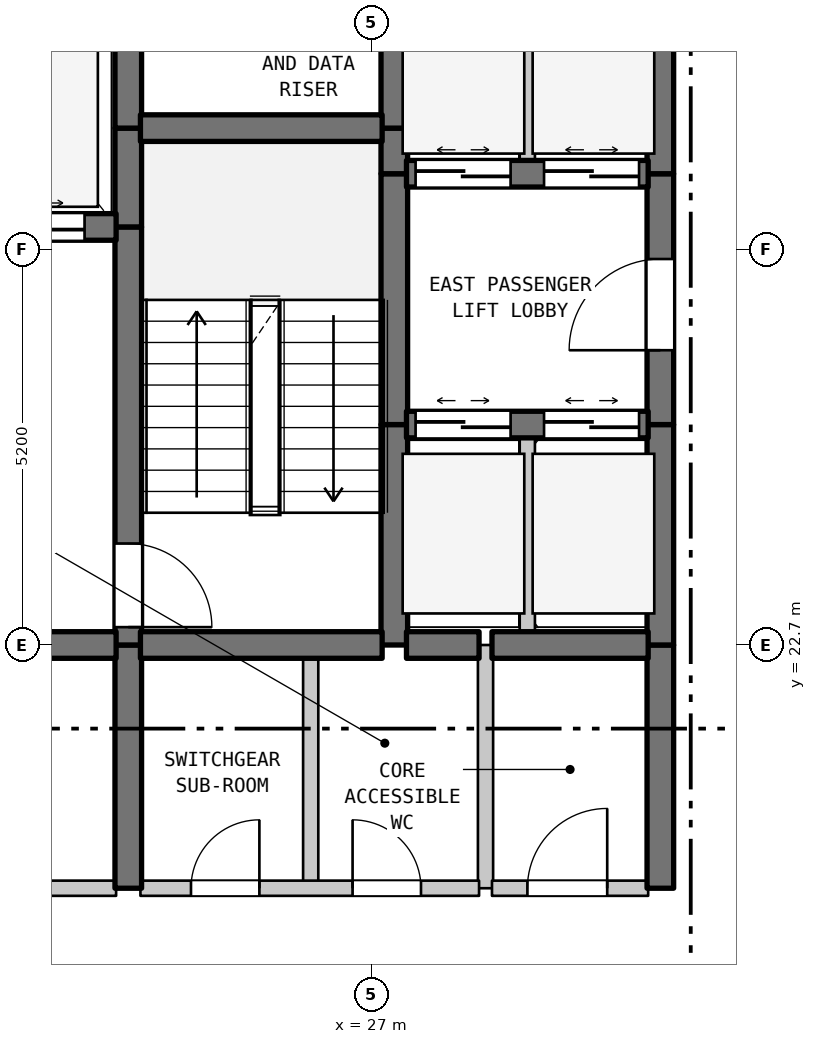
"""IFC4 building model, lengths in metres.
Left out: names, types, materials, properties, quantities, classifications, styles, units other than length and angle.
Written with IfcOpenShell. Run it as: python <this file> out.ifc"""

import sys

from ifc_helpers import new_model, si_unit, direction, frame, frame_2d, origin, place, context, subcontext, project, spatial, rectangle, extrude, element, fill, save


model = new_model("IFC4")
c1 = context("Model", 3, precision=1e-05, world=origin(), true_north=direction((0.0, 1.0)))
c2 = subcontext(c1, "Body", "Model", "MODEL_VIEW")
j1 = project(units=[si_unit("LENGTHUNIT", "METRE"), si_unit("PLANEANGLEUNIT", "RADIAN")], contexts=[c1])
p1 = place(None, origin())
s1 = spatial("IfcSite", under=j1, at=p1, CompositionType="ELEMENT")
p2 = place(p1, origin())
s2 = spatial("IfcBuilding", under=s1, at=p2, CompositionType="ELEMENT")
p3 = place(p2, frame((0.0, 0.0, 214.3)))
s3 = spatial("IfcBuildingStorey", under=s2, at=p3, CompositionType="ELEMENT", Elevation=214.3)
p4 = place(p3, frame((23.8, 19.5, 0.0), z_axis=(0.0, 0.0, 1.0), x_axis=(0.0, 1.0, 0.0)))
e1 = element("IfcWall", 1, at=p4, inside=s3, PredefinedType="SHEAR", context=c2, shape_type="SweptSolid", body=[
    extrude(rectangle(XDim=3.2, YDim=0.35, at=frame_2d((1.6, 0.0))), origin(), (0.0, 0.0, 1.0), 3.38),
])
p5 = place(p3, frame((23.8, 22.7, 0.0), z_axis=(0.0, 0.0, 1.0), x_axis=(0.0, 1.0, 0.0)))
e2 = element("IfcWall", 2, at=p5, inside=s3, PredefinedType="SHEAR", context=c2, shape_type="SweptSolid", body=[
    extrude(rectangle(XDim=5.5, YDim=0.35, at=frame_2d((2.75, 0.0))), origin(), (0.0, 0.0, 1.0), 3.38),
])
p6 = place(p5, frame((0.235, 0.0, 0.0)))
e3 = element("IfcOpeningElement", 3, at=p6, cuts=e2, PredefinedType="OPENING", context=c2, shape_type="SweptSolid", body=[
    extrude(rectangle(XDim=1.1, YDim=2.15, at=frame_2d((0.55, 1.075))), frame((0.0, 0.185, 0.0), z_axis=(0.0, -1.0, 0.0), x_axis=(1.0, 0.0, 0.0)), (0.0, 0.0, 1.0), 0.37),
])
for number, where, z_axis, x_axis in (
    (4, (23.8, 28.2, 0.0), (0.0, 0.0, 1.0), (0.0, 1.0, 0.0)),
    (5, (23.8, 29.5, 0.0), (0.0, 0.0, 1.0), (0.0, 1.0, 0.0)),
):
    element("IfcWall", number, at=place(p3, frame(where, z_axis=z_axis, x_axis=x_axis)), inside=s3, PredefinedType="SHEAR", context=c2, shape_type="SweptSolid", body=[
        extrude(rectangle(XDim=1.3, YDim=0.35, at=frame_2d((0.65, 0.0))), origin(), (0.0, 0.0, 1.0), 3.38),
    ])
p7 = place(p3, frame((26.2, 19.5, 0.0), z_axis=(0.0, 0.0, 1.0), x_axis=(0.0, 1.0, 0.0)))
e6 = element("IfcWall", 6, at=p7, inside=s3, PredefinedType="STANDARD", context=c2, shape_type="SweptSolid", body=[
    extrude(rectangle(XDim=3.2, YDim=0.2, at=frame_2d((1.6, 0.0))), origin(), (0.0, 0.0, 1.0), 3.38),
])
p8 = place(p3, frame((27.3, 22.7, 0.0), z_axis=(0.0, 0.0, 1.0), x_axis=(0.0, 1.0, 0.0)))
e7 = element("IfcWall", 7, at=p8, inside=s3, PredefinedType="SHEAR", context=c2, shape_type="SweptSolid", body=[
    extrude(rectangle(XDim=2.9, YDim=0.35, at=frame_2d((1.45, 0.0))), origin(), (0.0, 0.0, 1.0), 3.38),
])
p9 = place(p3, frame((27.3, 25.6, 0.0), z_axis=(0.0, 0.0, 1.0), x_axis=(0.0, 1.0, 0.0)))
e8 = element("IfcWall", 8, at=p9, inside=s3, PredefinedType="SHEAR", context=c2, shape_type="SweptSolid", body=[
    extrude(rectangle(XDim=3.3, YDim=0.35, at=frame_2d((1.65, 0.0))), origin(), (0.0, 0.0, 1.0), 3.38),
])
p10 = place(p3, frame((27.3, 28.9, 0.0), z_axis=(0.0, 0.0, 1.0), x_axis=(0.0, 1.0, 0.0)))
e9 = element("IfcWall", 9, at=p10, inside=s3, PredefinedType="SHEAR", context=c2, shape_type="SweptSolid", body=[
    extrude(rectangle(XDim=0.6, YDim=0.35, at=frame_2d((0.3, 0.0))), origin(), (0.0, 0.0, 1.0), 3.38),
])
p11 = place(p3, frame((27.3, 29.5, 0.0), z_axis=(0.0, 0.0, 1.0), x_axis=(0.0, 1.0, 0.0)))
e10 = element("IfcWall", 10, at=p11, inside=s3, PredefinedType="SHEAR", context=c2, shape_type="SweptSolid", body=[
    extrude(rectangle(XDim=2.0, YDim=0.35, at=frame_2d((1.0, 0.0))), origin(), (0.0, 0.0, 1.0), 3.38),
])
p12 = place(p3, frame((28.5, 19.5, 0.0), z_axis=(0.0, 0.0, 1.0), x_axis=(0.0, 1.0, 0.0)))
e11 = element("IfcWall", 11, at=p12, inside=s3, PredefinedType="STANDARD", context=c2, shape_type="SweptSolid", body=[
    extrude(rectangle(XDim=3.2, YDim=0.2, at=frame_2d((1.6, 0.0))), origin(), (0.0, 0.0, 1.0), 3.38),
])
p13 = place(p3, frame((29.05, 22.7, 0.0), z_axis=(0.0, 0.0, 1.0), x_axis=(0.0, 1.0, 0.0)))
e12 = element("IfcWall", 12, at=p13, inside=s3, PredefinedType="STANDARD", context=c2, shape_type="SweptSolid", body=[
    extrude(rectangle(XDim=2.9, YDim=0.2, at=frame_2d((1.45, 0.0))), origin(), (0.0, 0.0, 1.0), 3.38),
])
p14 = place(p3, frame((29.05, 28.9, 0.0), z_axis=(0.0, 0.0, 1.0), x_axis=(0.0, 1.0, 0.0)))
e13 = element("IfcWall", 13, at=p14, inside=s3, PredefinedType="STANDARD", context=c2, shape_type="SweptSolid", body=[
    extrude(rectangle(XDim=2.6, YDim=0.2, at=frame_2d((1.3, 0.0))), origin(), (0.0, 0.0, 1.0), 3.38),
])
p15 = place(p3, frame((30.8, 19.5, 0.0), z_axis=(0.0, 0.0, 1.0), x_axis=(0.0, 1.0, 0.0)))
e14 = element("IfcWall", 14, at=p15, inside=s3, PredefinedType="SHEAR", context=c2, shape_type="SweptSolid", body=[
    extrude(rectangle(XDim=3.2, YDim=0.35, at=frame_2d((1.6, 0.0))), origin(), (0.0, 0.0, 1.0), 3.38),
])
p16 = place(p3, frame((30.8, 22.7, 0.0), z_axis=(0.0, 0.0, 1.0), x_axis=(0.0, 1.0, 0.0)))
e15 = element("IfcWall", 15, at=p16, inside=s3, PredefinedType="SHEAR", context=c2, shape_type="SweptSolid", body=[
    extrude(rectangle(XDim=2.9, YDim=0.35, at=frame_2d((1.45, 0.0))), origin(), (0.0, 0.0, 1.0), 3.38),
])
p17 = place(p3, frame((30.8, 25.6, 0.0), z_axis=(0.0, 0.0, 1.0), x_axis=(0.0, 1.0, 0.0)))
e16 = element("IfcWall", 16, at=p17, inside=s3, PredefinedType="SHEAR", context=c2, shape_type="SweptSolid", body=[
    extrude(rectangle(XDim=3.3, YDim=0.35, at=frame_2d((1.65, 0.0))), origin(), (0.0, 0.0, 1.0), 3.38),
])
p18 = place(p17, frame((0.978, 0.0, 0.0)))
e17 = element("IfcOpeningElement", 17, at=p18, cuts=e16, PredefinedType="OPENING", context=c2, shape_type="SweptSolid", body=[
    extrude(rectangle(XDim=1.2, YDim=2.2, at=frame_2d((0.6, 1.1))), frame((0.0, 0.185, 0.0), z_axis=(0.0, -1.0, 0.0), x_axis=(1.0, 0.0, 0.0)), (0.0, 0.0, 1.0), 0.37),
])
p19 = place(p3, frame((30.8, 28.9, 0.0), z_axis=(0.0, 0.0, 1.0), x_axis=(0.0, 1.0, 0.0)))
e18 = element("IfcWall", 18, at=p19, inside=s3, PredefinedType="SHEAR", context=c2, shape_type="SweptSolid", body=[
    extrude(rectangle(XDim=2.6, YDim=0.35, at=frame_2d((1.3, 0.0))), origin(), (0.0, 0.0, 1.0), 3.38),
])
p20 = place(p3, frame((19.16, 19.5, 0.0), z_axis=(0.0, 0.0, 1.0), x_axis=(1.0, 0.0, 0.0)))
e19 = element("IfcWall", 19, at=p20, inside=s3, PredefinedType="STANDARD", context=c2, shape_type="SweptSolid", body=[
    extrude(rectangle(XDim=4.48, YDim=0.2, at=frame_2d((2.24, 0.0))), origin(), (0.0, 0.0, 1.0), 3.38),
])
p21 = place(p20, frame((1.64, 0.0, 0.0)))
e20 = element("IfcOpeningElement", 20, at=p21, cuts=e19, PredefinedType="OPENING", context=c2, shape_type="SweptSolid", body=[
    extrude(rectangle(XDim=1.2, YDim=2.2, at=frame_2d((0.6, 1.1))), frame((0.0, 0.11, 0.0), z_axis=(0.0, -1.0, 0.0), x_axis=(1.0, 0.0, 0.0)), (0.0, 0.0, 1.0), 0.22),
])
p22 = place(p3, frame((23.96, 19.5, 0.0), z_axis=(0.0, 0.0, 1.0), x_axis=(1.0, 0.0, 0.0)))
e21 = element("IfcWall", 21, at=p22, inside=s3, PredefinedType="STANDARD", context=c2, shape_type="SweptSolid", body=[
    extrude(rectangle(XDim=4.455, YDim=0.2, at=frame_2d((2.228, 0.0))), origin(), (0.0, 0.0, 1.0), 3.38),
])
p23 = place(p22, frame((0.665, 0.0, 0.0)))
e22 = element("IfcOpeningElement", 22, at=p23, cuts=e21, PredefinedType="OPENING", context=c2, shape_type="SweptSolid", body=[
    extrude(rectangle(XDim=0.9, YDim=2.15, at=frame_2d((0.45, 1.075))), frame((0.0, 0.11, 0.0), z_axis=(0.0, -1.0, 0.0), x_axis=(1.0, 0.0, 0.0)), (0.0, 0.0, 1.0), 0.22),
])
p24 = place(p22, frame((2.791, 0.0, 0.0)))
e23 = element("IfcOpeningElement", 23, at=p24, cuts=e21, PredefinedType="OPENING", context=c2, shape_type="SweptSolid", body=[
    extrude(rectangle(XDim=0.9, YDim=2.15, at=frame_2d((0.45, 1.075))), frame((0.0, 0.11, 0.0), z_axis=(0.0, -1.0, 0.0), x_axis=(1.0, 0.0, 0.0)), (0.0, 0.0, 1.0), 0.22),
])
p25 = place(p3, frame((28.585, 19.5, 0.0), z_axis=(0.0, 0.0, 1.0), x_axis=(1.0, 0.0, 0.0)))
e24 = element("IfcWall", 24, at=p25, inside=s3, PredefinedType="STANDARD", context=c2, shape_type="SweptSolid", body=[
    extrude(rectangle(XDim=2.055, YDim=0.2, at=frame_2d((1.027, 0.0))), origin(), (0.0, 0.0, 1.0), 3.38),
])
p26 = place(p25, frame((0.466, 0.0, 0.0)))
e25 = element("IfcOpeningElement", 25, at=p26, cuts=e24, PredefinedType="OPENING", context=c2, shape_type="SweptSolid", body=[
    extrude(rectangle(XDim=1.05, YDim=2.15, at=frame_2d((0.525, 1.075))), frame((0.0, 0.11, 0.0), z_axis=(0.0, -1.0, 0.0), x_axis=(1.0, 0.0, 0.0)), (0.0, 0.0, 1.0), 0.22),
])
p27 = place(p3, frame((19.16, 22.7, 0.0), z_axis=(0.0, 0.0, 1.0), x_axis=(1.0, 0.0, 0.0)))
e26 = element("IfcWall", 26, at=p27, inside=s3, PredefinedType="SHEAR", context=c2, shape_type="SweptSolid", body=[
    extrude(rectangle(XDim=4.48, YDim=0.35, at=frame_2d((2.24, 0.0))), origin(), (0.0, 0.0, 1.0), 3.38),
])
p28 = place(p27, frame((1.64, 0.0, 0.0)))
e27 = element("IfcOpeningElement", 27, at=p28, cuts=e26, PredefinedType="OPENING", context=c2, shape_type="SweptSolid", body=[
    extrude(rectangle(XDim=1.2, YDim=2.2, at=frame_2d((0.6, 1.1))), frame((0.0, 0.185, 0.0), z_axis=(0.0, -1.0, 0.0), x_axis=(1.0, 0.0, 0.0)), (0.0, 0.0, 1.0), 0.37),
])
p29 = place(p3, frame((23.96, 22.7, 0.0), z_axis=(0.0, 0.0, 1.0), x_axis=(1.0, 0.0, 0.0)))
e28 = element("IfcWall", 28, at=p29, inside=s3, PredefinedType="SHEAR", context=c2, shape_type="SweptSolid", body=[
    extrude(rectangle(XDim=3.18, YDim=0.35, at=frame_2d((1.59, 0.0))), origin(), (0.0, 0.0, 1.0), 3.38),
])
p30 = place(p3, frame((27.46, 22.7, 0.0), z_axis=(0.0, 0.0, 1.0), x_axis=(1.0, 0.0, 0.0)))
e29 = element("IfcWall", 29, at=p30, inside=s3, PredefinedType="SHEAR", context=c2, shape_type="SweptSolid", body=[
    extrude(rectangle(XDim=0.955, YDim=0.35, at=frame_2d((0.478, 0.0))), origin(), (0.0, 0.0, 1.0), 3.38),
])
p31 = place(p3, frame((28.585, 22.7, 0.0), z_axis=(0.0, 0.0, 1.0), x_axis=(1.0, 0.0, 0.0)))
e30 = element("IfcWall", 30, at=p31, inside=s3, PredefinedType="SHEAR", context=c2, shape_type="SweptSolid", body=[
    extrude(rectangle(XDim=2.055, YDim=0.35, at=frame_2d((1.027, 0.0))), origin(), (0.0, 0.0, 1.0), 3.38),
])
p32 = place(p3, frame((27.46, 25.6, 0.0), z_axis=(0.0, 0.0, 1.0), x_axis=(1.0, 0.0, 0.0)))
e31 = element("IfcWall", 31, at=p32, inside=s3, PredefinedType="SHEAR", context=c2, shape_type="SweptSolid", body=[
    extrude(rectangle(XDim=3.18, YDim=0.35, at=frame_2d((1.59, 0.0))), origin(), (0.0, 0.0, 1.0), 3.38),
])
p33 = place(p32, frame((0.12, 0.0, 0.0)))
e32 = element("IfcOpeningElement", 32, at=p33, cuts=e31, PredefinedType="OPENING", context=c2, shape_type="SweptSolid", body=[
    extrude(rectangle(XDim=1.25, YDim=2.2, at=frame_2d((0.625, 1.1))), frame((0.0, 0.185, 0.0), z_axis=(0.0, -1.0, 0.0), x_axis=(1.0, 0.0, 0.0)), (0.0, 0.0, 1.0), 0.37),
])
p34 = place(p32, frame((1.81, 0.0, 0.0)))
e33 = element("IfcOpeningElement", 33, at=p34, cuts=e31, PredefinedType="OPENING", context=c2, shape_type="SweptSolid", body=[
    extrude(rectangle(XDim=1.25, YDim=2.2, at=frame_2d((0.625, 1.1))), frame((0.0, 0.185, 0.0), z_axis=(0.0, -1.0, 0.0), x_axis=(1.0, 0.0, 0.0)), (0.0, 0.0, 1.0), 0.37),
])
p35 = place(p3, frame((19.16, 28.2, 0.0), z_axis=(0.0, 0.0, 1.0), x_axis=(1.0, 0.0, 0.0)))
e34 = element("IfcWall", 34, at=p35, inside=s3, PredefinedType="SHEAR", context=c2, shape_type="SweptSolid", body=[
    extrude(rectangle(XDim=4.48, YDim=0.35, at=frame_2d((2.24, 0.0))), origin(), (0.0, 0.0, 1.0), 3.38),
])
p36 = place(p35, frame((0.415, 0.0, 0.0)))
e35 = element("IfcOpeningElement", 35, at=p36, cuts=e34, PredefinedType="OPENING", context=c2, shape_type="SweptSolid", body=[
    extrude(rectangle(XDim=1.25, YDim=2.2, at=frame_2d((0.625, 1.1))), frame((0.0, 0.185, 0.0), z_axis=(0.0, -1.0, 0.0), x_axis=(1.0, 0.0, 0.0)), (0.0, 0.0, 1.0), 0.37),
])
p37 = place(p35, frame((2.815, 0.0, 0.0)))
e36 = element("IfcOpeningElement", 36, at=p37, cuts=e34, PredefinedType="OPENING", context=c2, shape_type="SweptSolid", body=[
    extrude(rectangle(XDim=1.25, YDim=2.2, at=frame_2d((0.625, 1.1))), frame((0.0, 0.185, 0.0), z_axis=(0.0, -1.0, 0.0), x_axis=(1.0, 0.0, 0.0)), (0.0, 0.0, 1.0), 0.37),
])
p38 = place(p3, frame((27.46, 28.9, 0.0), z_axis=(0.0, 0.0, 1.0), x_axis=(1.0, 0.0, 0.0)))
e37 = element("IfcWall", 37, at=p38, inside=s3, PredefinedType="SHEAR", context=c2, shape_type="SweptSolid", body=[
    extrude(rectangle(XDim=3.18, YDim=0.35, at=frame_2d((1.59, 0.0))), origin(), (0.0, 0.0, 1.0), 3.38),
])
p39 = place(p38, frame((0.12, 0.0, 0.0)))
e38 = element("IfcOpeningElement", 38, at=p39, cuts=e37, PredefinedType="OPENING", context=c2, shape_type="SweptSolid", body=[
    extrude(rectangle(XDim=1.25, YDim=2.2, at=frame_2d((0.625, 1.1))), frame((0.0, 0.185, 0.0), z_axis=(0.0, -1.0, 0.0), x_axis=(1.0, 0.0, 0.0)), (0.0, 0.0, 1.0), 0.37),
])
p40 = place(p38, frame((1.81, 0.0, 0.0)))
e39 = element("IfcOpeningElement", 39, at=p40, cuts=e37, PredefinedType="OPENING", context=c2, shape_type="SweptSolid", body=[
    extrude(rectangle(XDim=1.25, YDim=2.2, at=frame_2d((0.625, 1.1))), frame((0.0, 0.185, 0.0), z_axis=(0.0, -1.0, 0.0), x_axis=(1.0, 0.0, 0.0)), (0.0, 0.0, 1.0), 0.37),
])
p41 = place(p3, frame((23.96, 29.5, 0.0), z_axis=(0.0, 0.0, 1.0), x_axis=(1.0, 0.0, 0.0)))
e40 = element("IfcWall", 40, at=p41, inside=s3, PredefinedType="SHEAR", context=c2, shape_type="SweptSolid", body=[
    extrude(rectangle(XDim=3.18, YDim=0.35, at=frame_2d((1.59, 0.0))), origin(), (0.0, 0.0, 1.0), 3.38),
])
p42 = place(p6, frame((1.1, 0.0, 0.0), z_axis=(0.0, 0.0, 1.0), x_axis=(-1.0, 0.0, 0.0)))
e41 = element("IfcDoor", 41, at=p42, inside=s3, OperationType="SINGLE_SWING_LEFT", PredefinedType="DOOR", context=c2, shape_type="SweptSolid", body=[
    extrude(rectangle(XDim=1.1, YDim=2.15, at=frame_2d((0.55, 1.075))), frame((0.0, 0.025, 0.0), z_axis=(0.0, -1.0, 0.0), x_axis=(1.0, 0.0, 0.0)), (0.0, 0.0, 1.0), 0.05),
])
fill(e3, e41)
p43 = place(p18, origin())
e42 = element("IfcDoor", 42, at=p43, inside=s3, OperationType="SINGLE_SWING_LEFT", PredefinedType="DOOR", context=c2, shape_type="SweptSolid", body=[
    extrude(rectangle(XDim=1.2, YDim=2.2, at=frame_2d((0.6, 1.1))), frame((0.0, 0.025, 0.0), z_axis=(0.0, -1.0, 0.0), x_axis=(1.0, 0.0, 0.0)), (0.0, 0.0, 1.0), 0.05),
])
fill(e17, e42)
p44 = place(p23, origin())
e43 = element("IfcDoor", 43, at=p44, inside=s3, OperationType="SINGLE_SWING_RIGHT", PredefinedType="DOOR", context=c2, shape_type="SweptSolid", body=[
    extrude(rectangle(XDim=0.9, YDim=2.15, at=frame_2d((0.45, 1.075))), frame((0.0, 0.025, 0.0), z_axis=(0.0, -1.0, 0.0), x_axis=(1.0, 0.0, 0.0)), (0.0, 0.0, 1.0), 0.05),
])
fill(e22, e43)
p45 = place(p24, origin())
e44 = element("IfcDoor", 44, at=p45, inside=s3, OperationType="SINGLE_SWING_LEFT", PredefinedType="DOOR", context=c2, shape_type="SweptSolid", body=[
    extrude(rectangle(XDim=0.9, YDim=2.15, at=frame_2d((0.45, 1.075))), frame((0.0, 0.025, 0.0), z_axis=(0.0, -1.0, 0.0), x_axis=(1.0, 0.0, 0.0)), (0.0, 0.0, 1.0), 0.05),
])
fill(e23, e44)
p46 = place(p26, origin())
e45 = element("IfcDoor", 45, at=p46, inside=s3, OperationType="SINGLE_SWING_RIGHT", PredefinedType="DOOR", context=c2, shape_type="SweptSolid", body=[
    extrude(rectangle(XDim=1.05, YDim=2.15, at=frame_2d((0.525, 1.075))), frame((0.0, 0.025, 0.0), z_axis=(0.0, -1.0, 0.0), x_axis=(1.0, 0.0, 0.0)), (0.0, 0.0, 1.0), 0.05),
])
fill(e25, e45)
p47 = place(p33, origin())
e46 = element("IfcDoor", 46, at=p47, inside=s3, OperationType="DOUBLE_DOOR_SLIDING", PredefinedType="DOOR", context=c2, shape_type="SweptSolid", body=[
    extrude(rectangle(XDim=1.25, YDim=2.2, at=frame_2d((0.625, 1.1))), frame((0.0, 0.025, 0.0), z_axis=(0.0, -1.0, 0.0), x_axis=(1.0, 0.0, 0.0)), (0.0, 0.0, 1.0), 0.05),
])
fill(e32, e46)
p48 = place(p34, origin())
e47 = element("IfcDoor", 47, at=p48, inside=s3, OperationType="DOUBLE_DOOR_SLIDING", PredefinedType="DOOR", context=c2, shape_type="SweptSolid", body=[
    extrude(rectangle(XDim=1.25, YDim=2.2, at=frame_2d((0.625, 1.1))), frame((0.0, 0.025, 0.0), z_axis=(0.0, -1.0, 0.0), x_axis=(1.0, 0.0, 0.0)), (0.0, 0.0, 1.0), 0.05),
])
fill(e33, e47)
p49 = place(p37, origin())
e48 = element("IfcDoor", 48, at=p49, inside=s3, OperationType="DOUBLE_DOOR_SLIDING", PredefinedType="DOOR", context=c2, shape_type="SweptSolid", body=[
    extrude(rectangle(XDim=1.25, YDim=2.2, at=frame_2d((0.625, 1.1))), frame((0.0, 0.025, 0.0), z_axis=(0.0, -1.0, 0.0), x_axis=(1.0, 0.0, 0.0)), (0.0, 0.0, 1.0), 0.05),
])
fill(e36, e48)
p50 = place(p39, origin())
e49 = element("IfcDoor", 49, at=p50, inside=s3, OperationType="DOUBLE_DOOR_SLIDING", PredefinedType="DOOR", context=c2, shape_type="SweptSolid", body=[
    extrude(rectangle(XDim=1.25, YDim=2.2, at=frame_2d((0.625, 1.1))), frame((0.0, 0.025, 0.0), z_axis=(0.0, -1.0, 0.0), x_axis=(1.0, 0.0, 0.0)), (0.0, 0.0, 1.0), 0.05),
])
fill(e38, e49)
p51 = place(p40, origin())
e50 = element("IfcDoor", 50, at=p51, inside=s3, OperationType="DOUBLE_DOOR_SLIDING", PredefinedType="DOOR", context=c2, shape_type="SweptSolid", body=[
    extrude(rectangle(XDim=1.25, YDim=2.2, at=frame_2d((0.625, 1.1))), frame((0.0, 0.025, 0.0), z_axis=(0.0, -1.0, 0.0), x_axis=(1.0, 0.0, 0.0)), (0.0, 0.0, 1.0), 0.05),
])
fill(e39, e50)
save(model, sys.argv[1])
